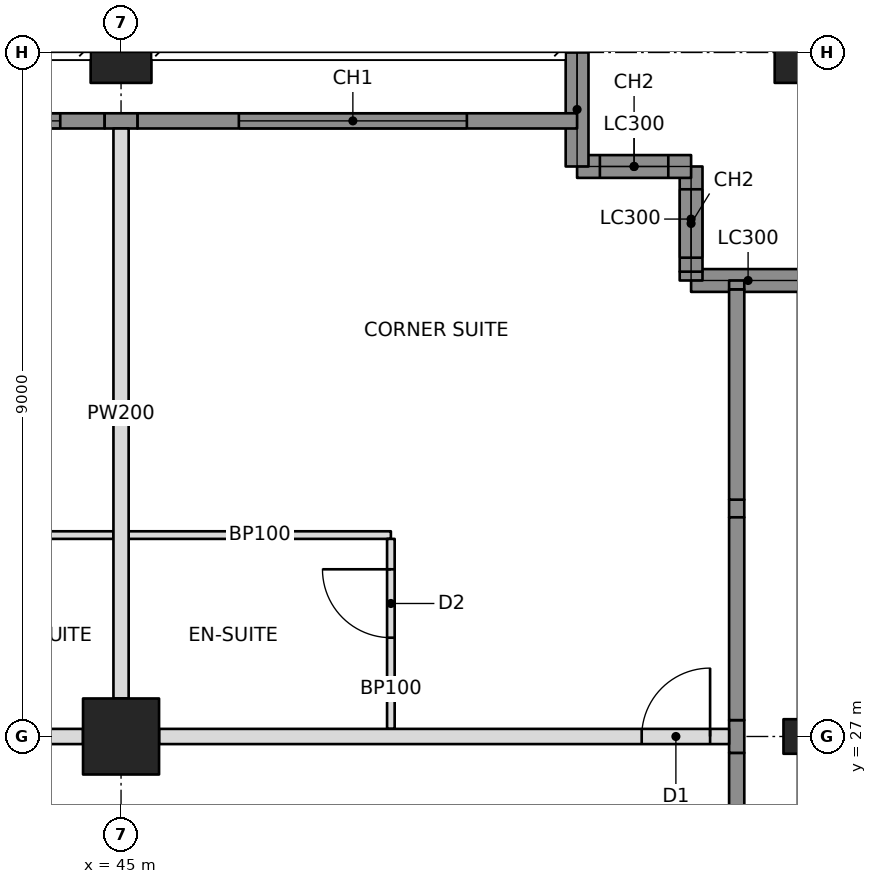
"""IFC4 building model, lengths in metres.
Left out: names, types, materials, properties, quantities, classifications, styles, units other than length and angle.
Written with IfcOpenShell. Run it as: python <this file> out.ifc"""

import sys

from ifc_helpers import new_model, si_unit, direction, frame, frame_2d, origin, origin_2d, place, context, subcontext, project, spatial, rectangle, hollow_rectangle, i_section, extrude, element, fill, save


model = new_model("IFC4")
c1 = context("Model", 3, precision=1e-05, world=origin(), true_north=direction((0.0, 1.0)))
c2 = subcontext(c1, "Body", "Model", "MODEL_VIEW")
j1 = project(units=[si_unit("LENGTHUNIT", "METRE"), si_unit("PLANEANGLEUNIT", "RADIAN")], contexts=[c1])
p1 = place(None, origin())
s1 = spatial("IfcSite", under=j1, at=p1, CompositionType="ELEMENT")
p2 = place(p1, origin())
s2 = spatial("IfcBuilding", under=s1, at=p2, CompositionType="ELEMENT")
p3 = place(p2, frame((0.0, 0.0, 85.8)))
s3 = spatial("IfcBuildingStorey", under=s2, at=p3, CompositionType="ELEMENT", Elevation=85.8)
p4 = place(p3, frame((45.0, 27.0, 0.0), z_axis=(0.0, 0.0, 1.0), x_axis=(0.0, 1.0, 0.0)))
e1 = element("IfcColumn", 1, at=p4, inside=s3, PredefinedType="COLUMN", context=c2, shape_type="SweptSolid", body=[
    extrude(hollow_rectangle(XDim=1.0, YDim=1.0, WallThickness=0.1, at=origin_2d()), origin(), (0.0, 0.0, 1.0), 3.4),
])
p5 = place(p3, frame((45.0, 36.0, 0.0), z_axis=(0.0, 0.0, 1.0), x_axis=(1.0, 0.0, 0.0)))
e2 = element("IfcColumn", 2, at=p5, inside=s3, PredefinedType="COLUMN", context=c2, shape_type="SweptSolid", body=[
    extrude(hollow_rectangle(XDim=0.8, YDim=0.8, WallThickness=0.07, at=origin_2d()), origin(), (0.0, 0.0, 1.0), 3.4),
])
p6 = place(p3, frame((54.0, 27.0, 0.0), z_axis=(0.0, 0.0, 1.0), x_axis=(0.0, 1.0, 0.0)))
e3 = element("IfcColumn", 3, at=p6, inside=s3, PredefinedType="COLUMN", context=c2, shape_type="SweptSolid", body=[
    extrude(i_section(OverallWidth=0.455, OverallDepth=0.569, WebThickness=0.078, FlangeThickness=0.125, at=origin_2d()), origin(), (0.0, 0.0, 1.0), 3.4),
])
p7 = place(p3, frame((54.0, 36.0, 0.0), z_axis=(0.0, 0.0, 1.0), x_axis=(1.0, 0.0, 0.0)))
e4 = element("IfcColumn", 4, at=p7, inside=s3, PredefinedType="COLUMN", context=c2, shape_type="SweptSolid", body=[
    extrude(hollow_rectangle(XDim=0.8, YDim=0.8, WallThickness=0.07, at=origin_2d()), origin(), (0.0, 0.0, 1.0), 3.4),
])
p8 = place(p3, frame((54.0, 33.0, 0.0), z_axis=(0.0, 0.0, 1.0), x_axis=(-1.0, 0.0, 0.0)))
e5 = element("IfcWall", 5, at=p8, inside=s3, PredefinedType="SOLIDWALL", context=c2, shape_type="SweptSolid", body=[
    extrude(rectangle(XDim=1.5, YDim=0.3, at=frame_2d((0.75, 0.0))), origin(), (0.0, 0.0, 1.0), 2.202),
])
p9 = place(p3, frame((52.5, 33.0, 0.0), z_axis=(0.0, 0.0, 1.0), x_axis=(0.0, 1.0, 0.0)))
e6 = element("IfcWall", 6, at=p9, inside=s3, PredefinedType="SOLIDWALL", context=c2, shape_type="SweptSolid", body=[
    extrude(rectangle(XDim=0.116, YDim=0.3, at=frame_2d((0.058, 0.0))), origin(), (0.0, 0.0, 1.0), 2.542),
])
p10 = place(p3, frame((52.5, 34.5, 0.0), z_axis=(0.0, 0.0, 1.0), x_axis=(-1.0, 0.0, 0.0)))
e7 = element("IfcWall", 7, at=p10, inside=s3, PredefinedType="SOLIDWALL", context=c2, shape_type="SweptSolid", body=[
    extrude(rectangle(XDim=1.5, YDim=0.3, at=frame_2d((0.75, 0.0))), origin(), (0.0, 0.0, 1.0), 3.15),
])
p11 = place(p10, frame((0.3, 0.0, 0.6)))
e8 = element("IfcOpeningElement", 8, at=p11, cuts=e7, PredefinedType="OPENING", context=c2, shape_type="SweptSolid", body=[
    extrude(rectangle(XDim=0.9, YDim=2.2, at=frame_2d((0.45, 1.1))), frame((0.0, 0.16, 0.0), z_axis=(0.0, -1.0, 0.0), x_axis=(1.0, 0.0, 0.0)), (0.0, 0.0, 1.0), 0.32),
])
p12 = place(p3, frame((51.0, 34.5, 0.0), z_axis=(0.0, 0.0, 1.0), x_axis=(0.0, 1.0, 0.0)))
e9 = element("IfcWall", 9, at=p12, inside=s3, PredefinedType="SOLIDWALL", context=c2, shape_type="SweptSolid", body=[
    extrude(rectangle(XDim=1.5, YDim=0.3, at=frame_2d((0.75, 0.0))), origin(), (0.0, 0.0, 1.0), 2.202),
])
p13 = place(p3, frame((36.5, 27.0, 0.0), z_axis=(0.0, 0.0, 1.0), x_axis=(1.0, 0.0, 0.0)))
e10 = element("IfcWall", 10, at=p13, inside=s3, PredefinedType="PARTITIONING", context=c2, shape_type="SweptSolid", body=[
    extrude(rectangle(XDim=8.0, YDim=0.2, at=frame_2d((4.0, 0.0))), origin(), (0.0, 0.0, 1.0), 2.21),
])
p14 = place(p13, frame((2.85, 0.0, 0.0)))
e11 = element("IfcOpeningElement", 11, at=p14, cuts=e10, PredefinedType="OPENING", context=c2, shape_type="SweptSolid", body=[
    extrude(rectangle(XDim=0.9, YDim=2.1, at=frame_2d((0.45, 1.05))), frame((0.0, 0.11, 0.0), z_axis=(0.0, -1.0, 0.0), x_axis=(1.0, 0.0, 0.0)), (0.0, 0.0, 1.0), 0.22),
])
p15 = place(p13, frame((4.25, 0.0, 0.0)))
e12 = element("IfcOpeningElement", 12, at=p15, cuts=e10, PredefinedType="OPENING", context=c2, shape_type="SweptSolid", body=[
    extrude(rectangle(XDim=0.9, YDim=2.1, at=frame_2d((0.45, 1.05))), frame((0.0, 0.11, 0.0), z_axis=(0.0, -1.0, 0.0), x_axis=(1.0, 0.0, 0.0)), (0.0, 0.0, 1.0), 0.22),
])
p16 = place(p3, frame((45.5, 27.0, 0.0), z_axis=(0.0, 0.0, 1.0), x_axis=(1.0, 0.0, 0.0)))
e13 = element("IfcWall", 13, at=p16, inside=s3, PredefinedType="PARTITIONING", context=c2, shape_type="SweptSolid", body=[
    extrude(rectangle(XDim=7.5, YDim=0.2, at=frame_2d((3.75, 0.0))), origin(), (0.0, 0.0, 1.0), 2.21),
])
p17 = place(p16, frame((6.35, 0.0, 0.0)))
e14 = element("IfcOpeningElement", 14, at=p17, cuts=e13, PredefinedType="OPENING", context=c2, shape_type="SweptSolid", body=[
    extrude(rectangle(XDim=0.9, YDim=2.1, at=frame_2d((0.45, 1.05))), frame((0.0, 0.11, 0.0), z_axis=(0.0, -1.0, 0.0), x_axis=(1.0, 0.0, 0.0)), (0.0, 0.0, 1.0), 0.22),
])
p18 = place(p3, frame((45.0, 27.5, 0.0), z_axis=(0.0, 0.0, 1.0), x_axis=(0.0, 1.0, 0.0)))
e15 = element("IfcWall", 15, at=p18, inside=s3, PredefinedType="PARTITIONING", context=c2, shape_type="SweptSolid", body=[
    extrude(rectangle(XDim=7.5, YDim=0.2, at=frame_2d((3.75, 0.0))), origin(), (0.0, 0.0, 1.0), 2.21),
])
p19 = place(p3, frame((41.95, 29.65, 0.0), z_axis=(0.0, 0.0, 1.0), x_axis=(1.0, 0.0, 0.0)))
e16 = element("IfcWall", 16, at=p19, inside=s3, PredefinedType="PARTITIONING", context=c2, shape_type="SweptSolid", body=[
    extrude(rectangle(XDim=2.95, YDim=0.1, at=frame_2d((1.475, 0.0))), origin(), (0.0, 0.0, 1.0), 2.21),
])
p20 = place(p3, frame((45.1, 29.65, 0.0), z_axis=(0.0, 0.0, 1.0), x_axis=(1.0, 0.0, 0.0)))
e17 = element("IfcWall", 17, at=p20, inside=s3, PredefinedType="PARTITIONING", context=c2, shape_type="SweptSolid", body=[
    extrude(rectangle(XDim=3.45, YDim=0.1, at=frame_2d((1.725, 0.0))), origin(), (0.0, 0.0, 1.0), 2.21),
])
p21 = place(p3, frame((48.55, 27.1, 0.0), z_axis=(0.0, 0.0, 1.0), x_axis=(0.0, 1.0, 0.0)))
e18 = element("IfcWall", 18, at=p21, inside=s3, PredefinedType="PARTITIONING", context=c2, shape_type="SweptSolid", body=[
    extrude(rectangle(XDim=2.5, YDim=0.1, at=frame_2d((1.25, 0.0))), origin(), (0.0, 0.0, 1.0), 2.21),
])
p22 = place(p21, frame((1.2, 0.0, 0.0)))
e19 = element("IfcOpeningElement", 19, at=p22, cuts=e18, PredefinedType="OPENING", context=c2, shape_type="SweptSolid", body=[
    extrude(rectangle(XDim=0.9, YDim=2.1, at=frame_2d((0.45, 1.05))), frame((0.0, 0.06, 0.0), z_axis=(0.0, -1.0, 0.0), x_axis=(1.0, 0.0, 0.0)), (0.0, 0.0, 1.0), 0.12),
])
p23 = place(p3, frame((52.5, 33.116, 0.0), z_axis=(0.0, 0.0, 1.0), x_axis=(0.0, 1.0, 0.0)))
e20 = element("IfcWall", 20, at=p23, inside=s3, PredefinedType="SOLIDWALL", context=c2, shape_type="SweptSolid", body=[
    extrude(rectangle(XDim=1.384, YDim=0.3, at=frame_2d((0.692, 0.0))), origin(), (0.0, 0.0, 1.0), 3.15),
])
p24 = place(p23, frame((0.184, 0.0, 0.6)))
e21 = element("IfcOpeningElement", 21, at=p24, cuts=e20, PredefinedType="OPENING", context=c2, shape_type="SweptSolid", body=[
    extrude(rectangle(XDim=0.9, YDim=2.2, at=frame_2d((0.45, 1.1))), frame((0.0, 0.16, 0.0), z_axis=(0.0, -1.0, 0.0), x_axis=(1.0, 0.0, 0.0)), (0.0, 0.0, 1.0), 0.32),
])
p25 = place(p3, frame((36.215, 35.1, 0.0), z_axis=(0.0, 0.0, 1.0), x_axis=(1.0, 0.0, 0.0)))
e22 = element("IfcWall", 22, at=p25, inside=s3, PredefinedType="SOLIDWALL", context=c2, shape_type="SweptSolid", body=[
    extrude(rectangle(XDim=8.569, YDim=0.2, at=frame_2d((4.285, 0.0))), origin(), (0.0, 0.0, 1.0), 3.15),
])
p26 = place(p25, frame((0.585, 0.0, 0.6)))
e23 = element("IfcOpeningElement", 23, at=p26, cuts=e22, PredefinedType="OPENING", context=c2, shape_type="SweptSolid", body=[
    extrude(rectangle(XDim=3.0, YDim=2.2, at=frame_2d((1.5, 1.1))), frame((0.0, 0.11, 0.0), z_axis=(0.0, -1.0, 0.0), x_axis=(1.0, 0.0, 0.0)), (0.0, 0.0, 1.0), 0.22),
])
p27 = place(p25, frame((4.985, 0.0, 0.6)))
e24 = element("IfcOpeningElement", 24, at=p27, cuts=e22, PredefinedType="OPENING", context=c2, shape_type="SweptSolid", body=[
    extrude(rectangle(XDim=3.0, YDim=2.2, at=frame_2d((1.5, 1.1))), frame((0.0, 0.11, 0.0), z_axis=(0.0, -1.0, 0.0), x_axis=(1.0, 0.0, 0.0)), (0.0, 0.0, 1.0), 0.22),
])
p28 = place(p3, frame((44.785, 35.1, 0.0), z_axis=(0.0, 0.0, 1.0), x_axis=(1.0, 0.0, 0.0)))
e25 = element("IfcWall", 25, at=p28, inside=s3, PredefinedType="SOLIDWALL", context=c2, shape_type="SweptSolid", body=[
    extrude(rectangle(XDim=0.431, YDim=0.2, at=frame_2d((0.215, 0.0))), origin(), (0.0, 0.0, 1.0), 2.21),
])
p29 = place(p3, frame((45.215, 35.1, 0.0), z_axis=(0.0, 0.0, 1.0), x_axis=(1.0, 0.0, 0.0)))
e26 = element("IfcWall", 26, at=p29, inside=s3, PredefinedType="SOLIDWALL", context=c2, shape_type="SweptSolid", body=[
    extrude(rectangle(XDim=5.785, YDim=0.2, at=frame_2d((2.892, 0.0))), origin(), (0.0, 0.0, 1.0), 3.15),
])
p30 = place(p29, frame((1.335, 0.0, 0.6)))
e27 = element("IfcOpeningElement", 27, at=p30, cuts=e26, PredefinedType="OPENING", context=c2, shape_type="SweptSolid", body=[
    extrude(rectangle(XDim=3.0, YDim=2.2, at=frame_2d((1.5, 1.1))), frame((0.0, 0.11, 0.0), z_axis=(0.0, -1.0, 0.0), x_axis=(1.0, 0.0, 0.0)), (0.0, 0.0, 1.0), 0.22),
])
p31 = place(p3, frame((53.1, 18.214, 0.0), z_axis=(0.0, 0.0, 1.0), x_axis=(0.0, 1.0, 0.0)))
e28 = element("IfcWall", 28, at=p31, inside=s3, PredefinedType="SOLIDWALL", context=c2, shape_type="SweptSolid", body=[
    extrude(rectangle(XDim=8.571, YDim=0.2, at=frame_2d((4.285, 0.0))), origin(), (0.0, 0.0, 1.0), 3.15),
])
p32 = place(p31, frame((0.136, 0.0, 0.6)))
e29 = element("IfcOpeningElement", 29, at=p32, cuts=e28, PredefinedType="OPENING", context=c2, shape_type="SweptSolid", body=[
    extrude(rectangle(XDim=3.0, YDim=2.2, at=frame_2d((1.5, 1.1))), frame((0.0, 0.11, 0.0), z_axis=(0.0, -1.0, 0.0), x_axis=(1.0, 0.0, 0.0)), (0.0, 0.0, 1.0), 0.22),
])
p33 = place(p31, frame((3.636, 0.0, 0.6)))
e30 = element("IfcOpeningElement", 30, at=p33, cuts=e28, PredefinedType="OPENING", context=c2, shape_type="SweptSolid", body=[
    extrude(rectangle(XDim=3.0, YDim=2.2, at=frame_2d((1.5, 1.1))), frame((0.0, 0.11, 0.0), z_axis=(0.0, -1.0, 0.0), x_axis=(1.0, 0.0, 0.0)), (0.0, 0.0, 1.0), 0.22),
])
p34 = place(p3, frame((53.1, 26.785, 0.0), z_axis=(0.0, 0.0, 1.0), x_axis=(0.0, 1.0, 0.0)))
e31 = element("IfcWall", 31, at=p34, inside=s3, PredefinedType="SOLIDWALL", context=c2, shape_type="SweptSolid", body=[
    extrude(rectangle(XDim=0.431, YDim=0.2, at=frame_2d((0.215, 0.0))), origin(), (0.0, 0.0, 1.0), 2.21),
])
p35 = place(p3, frame((53.1, 27.215, 0.0), z_axis=(0.0, 0.0, 1.0), x_axis=(0.0, 1.0, 0.0)))
e32 = element("IfcWall", 32, at=p35, inside=s3, PredefinedType="SOLIDWALL", context=c2, shape_type="SweptSolid", body=[
    extrude(rectangle(XDim=2.668, YDim=0.2, at=frame_2d((1.334, 0.0))), origin(), (0.0, 0.0, 1.0), 3.15),
])
p36 = place(p3, frame((53.1, 29.884, 0.0), z_axis=(0.0, 0.0, 1.0), x_axis=(0.0, 1.0, 0.0)))
e33 = element("IfcWall", 33, at=p36, inside=s3, PredefinedType="SOLIDWALL", context=c2, shape_type="SweptSolid", body=[
    extrude(rectangle(XDim=0.232, YDim=0.2, at=frame_2d((0.116, 0.0))), origin(), (0.0, 0.0, 1.0), 2.542),
])
p37 = place(p3, frame((53.1, 30.116, 0.0), z_axis=(0.0, 0.0, 1.0), x_axis=(0.0, 1.0, 0.0)))
e34 = element("IfcWall", 34, at=p37, inside=s3, PredefinedType="SOLIDWALL", context=c2, shape_type="SweptSolid", body=[
    extrude(rectangle(XDim=2.768, YDim=0.2, at=frame_2d((1.384, 0.0))), origin(), (0.0, 0.0, 1.0), 3.15),
])
p38 = place(p3, frame((53.1, 32.884, 0.0), z_axis=(0.0, 0.0, 1.0), x_axis=(0.0, 1.0, 0.0)))
e35 = element("IfcWall", 35, at=p38, inside=s3, PredefinedType="SOLIDWALL", context=c2, shape_type="SweptSolid", body=[
    extrude(rectangle(XDim=0.116, YDim=0.2, at=frame_2d((0.058, 0.0))), origin(), (0.0, 0.0, 1.0), 2.542),
])
p39 = place(p24, origin())
e36 = element("IfcWindow", 36, at=p39, inside=s3, PartitioningType="SINGLE_PANEL", PredefinedType="WINDOW", context=c2, shape_type="SweptSolid", body=[
    extrude(rectangle(XDim=0.9, YDim=2.2, at=frame_2d((0.45, 1.1))), frame((0.0, 0.03, 0.0), z_axis=(0.0, -1.0, 0.0), x_axis=(1.0, 0.0, 0.0)), (0.0, 0.0, 1.0), 0.06),
])
fill(e21, e36)
p40 = place(p11, origin())
e37 = element("IfcWindow", 37, at=p40, inside=s3, PartitioningType="SINGLE_PANEL", PredefinedType="WINDOW", context=c2, shape_type="SweptSolid", body=[
    extrude(rectangle(XDim=0.9, YDim=2.2, at=frame_2d((0.45, 1.1))), frame((0.0, 0.03, 0.0), z_axis=(0.0, -1.0, 0.0), x_axis=(1.0, 0.0, 0.0)), (0.0, 0.0, 1.0), 0.06),
])
fill(e8, e37)
p41 = place(p27, origin())
e38 = element("IfcWindow", 38, at=p41, inside=s3, PartitioningType="TRIPLE_PANEL_VERTICAL", PredefinedType="WINDOW", context=c2, shape_type="SweptSolid", body=[
    extrude(rectangle(XDim=3.0, YDim=2.2, at=frame_2d((1.5, 1.1))), frame((0.0, 0.03, 0.0), z_axis=(0.0, -1.0, 0.0), x_axis=(1.0, 0.0, 0.0)), (0.0, 0.0, 1.0), 0.06),
])
fill(e24, e38)
p42 = place(p30, origin())
e39 = element("IfcWindow", 39, at=p42, inside=s3, PartitioningType="TRIPLE_PANEL_VERTICAL", PredefinedType="WINDOW", context=c2, shape_type="SweptSolid", body=[
    extrude(rectangle(XDim=3.0, YDim=2.2, at=frame_2d((1.5, 1.1))), frame((0.0, 0.03, 0.0), z_axis=(0.0, -1.0, 0.0), x_axis=(1.0, 0.0, 0.0)), (0.0, 0.0, 1.0), 0.06),
])
fill(e27, e39)
p43 = place(p22, origin())
e40 = element("IfcDoor", 40, at=p43, inside=s3, OperationType="SINGLE_SWING_RIGHT", PredefinedType="DOOR", context=c2, shape_type="SweptSolid", body=[
    extrude(rectangle(XDim=0.9, YDim=2.1, at=frame_2d((0.45, 1.05))), frame((0.0, 0.025, 0.0), z_axis=(0.0, -1.0, 0.0), x_axis=(1.0, 0.0, 0.0)), (0.0, 0.0, 1.0), 0.05),
])
fill(e19, e40)
p44 = place(p17, origin())
e41 = element("IfcDoor", 41, at=p44, inside=s3, OperationType="SINGLE_SWING_RIGHT", PredefinedType="DOOR", context=c2, shape_type="SweptSolid", body=[
    extrude(rectangle(XDim=0.9, YDim=2.1, at=frame_2d((0.45, 1.05))), frame((0.0, 0.025, 0.0), z_axis=(0.0, -1.0, 0.0), x_axis=(1.0, 0.0, 0.0)), (0.0, 0.0, 1.0), 0.05),
])
fill(e14, e41)
save(model, sys.argv[1])
